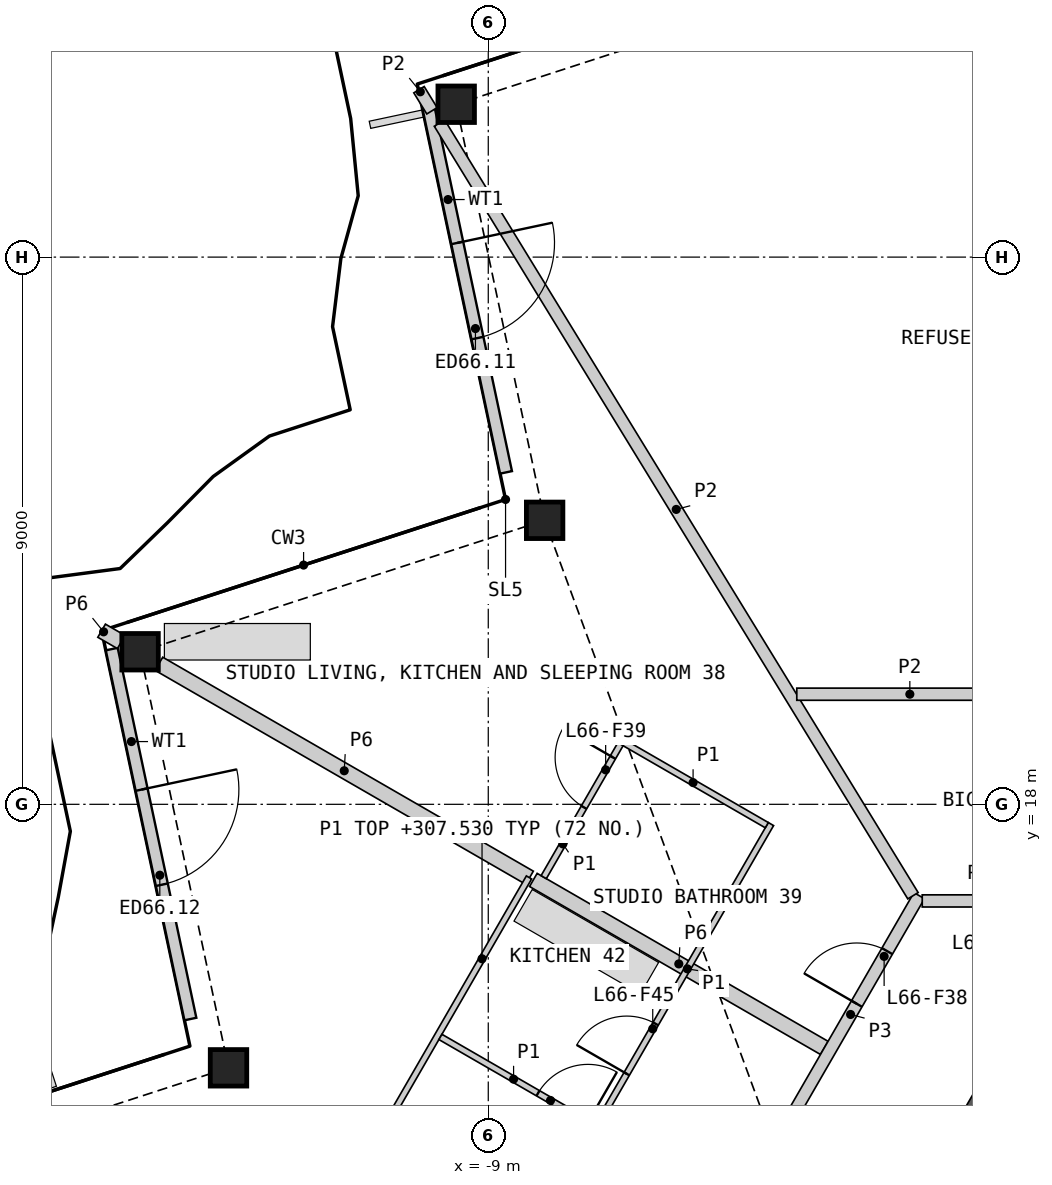
"""IFC4 building model, lengths in metres.
Left out: names, types, materials, properties, quantities, classifications, styles, units other than length and angle.
Written with IfcOpenShell. Run it as: python <this file> out.ifc"""

import sys

from ifc_helpers import new_model, si_unit, direction, frame, frame_2d, origin, origin_2d, place, context, subcontext, project, spatial, rectangle, hollow_rectangle, extrude, element, fill, save


model = new_model("IFC4")
c1 = context("Model", 3, precision=1e-05, world=origin(), true_north=direction((0.0, 1.0)))
c2 = subcontext(c1, "Body", "Model", "MODEL_VIEW")
j1 = project(units=[si_unit("LENGTHUNIT", "METRE"), si_unit("PLANEANGLEUNIT", "RADIAN")], contexts=[c1])
p1 = place(None, origin())
s1 = spatial("IfcSite", under=j1, at=p1, CompositionType="ELEMENT")
p2 = place(p1, origin())
s2 = spatial("IfcBuilding", under=s1, at=p2, CompositionType="ELEMENT")
p3 = place(p2, frame((0.0, 0.0, 305.2)))
s3 = spatial("IfcBuildingStorey", under=s2, at=p3, CompositionType="ELEMENT", Elevation=305.2)
for number, where, z_axis, x_axis in (
    (1, (-9.527, 29.514, 0.0), (0.0, 0.0, 1.0), (1.0, 0.0, 0.0)),
    (2, (-8.073, 22.671, 0.0), (0.0, 0.0, 1.0), (1.0, 0.0, 0.0)),
    (3, (-14.727, 20.509, 0.0), (0.0, 0.0, 1.0), (1.0, 0.0, 0.0)),
    (4, (-13.272, 13.666, 0.0), (0.0, 0.0, 1.0), (1.0, 0.0, 0.0)),
):
    element("IfcColumn", number, at=place(p3, frame(where, z_axis=z_axis, x_axis=x_axis)), inside=s3, PredefinedType="COLUMN", context=c2, shape_type="SweptSolid", body=[
        extrude(hollow_rectangle(XDim=0.6, YDim=0.6, WallThickness=0.04, at=origin_2d()), origin(), (0.0, 0.0, 1.0), 3.4),
    ])
p4 = place(p3, frame((-9.98, 29.443, 0.0), z_axis=(0.0, 0.0, 1.0), x_axis=(0.20793703803, -0.978142212674, 0.0)))
e5 = element("IfcWall", 5, at=p4, inside=s3, PredefinedType="SOLIDWALL", context=c2, shape_type="SweptSolid", body=[
    extrude(rectangle(XDim=6.117, YDim=0.2, at=frame_2d((3.059, 0.0))), origin(), (0.0, 0.0, 1.0), 2.488),
])
p5 = place(p4, frame((2.259, 0.0, 0.0)))
e6 = element("IfcOpeningElement", 6, at=p5, cuts=e5, PredefinedType="OPENING", context=c2, shape_type="SweptSolid", body=[
    extrude(rectangle(XDim=1.6, YDim=2.25, at=frame_2d((0.8, 1.125))), frame((0.0, 0.11, 0.0), z_axis=(0.0, -1.0, 0.0), x_axis=(1.0, 0.0, 0.0)), (0.0, 0.0, 1.0), 0.22),
])
p6 = place(p3, frame((-15.192, 20.553, 0.0), z_axis=(0.0, 0.0, 1.0), x_axis=(0.207920712138, -0.97814568315, 0.0)))
e7 = element("IfcWall", 7, at=p6, inside=s3, PredefinedType="SOLIDWALL", context=c2, shape_type="SweptSolid", body=[
    extrude(rectangle(XDim=6.221, YDim=0.2, at=frame_2d((3.11, 0.0))), origin(), (0.0, 0.0, 1.0), 2.488),
])
p7 = place(p6, frame((2.362, 0.0, 0.0)))
e8 = element("IfcOpeningElement", 8, at=p7, cuts=e7, PredefinedType="OPENING", context=c2, shape_type="SweptSolid", body=[
    extrude(rectangle(XDim=1.6, YDim=2.25, at=frame_2d((0.8, 1.125))), frame((0.0, 0.11, 0.0), z_axis=(0.0, -1.0, 0.0), x_axis=(1.0, 0.0, 0.0)), (0.0, 0.0, 1.0), 0.22),
])
p8 = place(p3, frame((-0.26, 13.961, 0.0), z_axis=(0.0, 0.0, 1.0), x_axis=(-0.499980485389, -0.866036670257, 0.0)))
e9 = element("IfcWall", 9, at=p8, inside=s3, PredefinedType="SHEAR", context=c2, shape_type="SweptSolid", body=[
    extrude(rectangle(XDim=4.559, YDim=0.6, at=frame_2d((2.28, 0.0))), origin(), (0.0, 0.0, 1.0), 3.1),
])
p9 = place(p3, frame((-14.417, 20.311, 0.0), z_axis=(0.0, 0.0, 1.0), x_axis=(0.866027308682, -0.499996700606, 0.0)))
e10 = element("IfcWall", 10, at=p9, inside=s3, PredefinedType="PARTITIONING", context=c2, shape_type="SweptSolid", body=[
    extrude(rectangle(XDim=7.038, YDim=0.25, at=frame_2d((3.519, 0.0))), origin(), (0.0, 0.0, 1.0), 2.33),
])
p10 = place(p3, frame((-8.259, 16.756, 0.0), z_axis=(0.0, 0.0, 1.0), x_axis=(0.866023692682, -0.500002963705, 0.0)))
e11 = element("IfcWall", 11, at=p10, inside=s3, PredefinedType="PARTITIONING", context=c2, shape_type="SweptSolid", body=[
    extrude(rectangle(XDim=5.525, YDim=0.25, at=frame_2d((2.762, 0.0))), origin(), (0.0, 0.0, 1.0), 2.33),
])
p11 = place(p3, frame((-4.169, 12.59, 0.0), z_axis=(0.0, 0.0, 1.0), x_axis=(0.499950370306, 0.866054055606, 0.0)))
e12 = element("IfcWall", 12, at=p11, inside=s3, PredefinedType="PARTITIONING", context=c2, shape_type="SweptSolid", body=[
    extrude(rectangle(XDim=4.513, YDim=0.2, at=frame_2d((2.256, 0.0))), origin(), (0.0, 0.0, 1.0), 3.1),
])
p12 = place(p11, frame((2.459, 0.0, 0.0)))
e13 = element("IfcOpeningElement", 13, at=p12, cuts=e12, PredefinedType="OPENING", context=c2, shape_type="SweptSolid", body=[
    extrude(rectangle(XDim=1.0, YDim=2.1, at=frame_2d((0.5, 1.05))), frame((0.0, 0.11, 0.0), z_axis=(0.0, -1.0, 0.0), x_axis=(1.0, 0.0, 0.0)), (0.0, 0.0, 1.0), 0.22),
])
p13 = place(p3, frame((-1.863, 16.411, 0.0), z_axis=(0.0, 0.0, 1.0), x_axis=(1.0, 0.0, 0.0)))
e14 = element("IfcWall", 14, at=p13, inside=s3, PredefinedType="PARTITIONING", context=c2, shape_type="SweptSolid", body=[
    extrude(rectangle(XDim=3.726, YDim=0.2, at=frame_2d((1.863, 0.0))), origin(), (0.0, 0.0, 1.0), 3.1),
])
p14 = place(p13, frame((1.388, 0.0, 0.0)))
e15 = element("IfcOpeningElement", 15, at=p14, cuts=e14, PredefinedType="OPENING", context=c2, shape_type="SweptSolid", body=[
    extrude(rectangle(XDim=0.95, YDim=2.1, at=frame_2d((0.475, 1.05))), frame((0.0, 0.11, 0.0), z_axis=(0.0, -1.0, 0.0), x_axis=(1.0, 0.0, 0.0)), (0.0, 0.0, 1.0), 0.22),
])
p15 = place(p3, frame((-15.359, 20.855, 0.0), z_axis=(0.0, 0.0, 1.0), x_axis=(0.865770353626, -0.500441499861, 0.0)))
e16 = element("IfcWall", 16, at=p15, inside=s3, PredefinedType="PARTITIONING", context=c2, shape_type="SweptSolid", body=[
    extrude(rectangle(XDim=0.372, YDim=0.25, at=frame_2d((0.186, 0.0))), origin(), (0.0, 0.0, 1.0), 2.33),
])
p16 = place(p3, frame((-9.802, 29.204, 0.0), z_axis=(0.0, 0.0, 1.0), x_axis=(0.522487920222, -0.852646687217, 0.0)))
e17 = element("IfcWall", 17, at=p16, inside=s3, PredefinedType="PARTITIONING", context=c2, shape_type="SweptSolid", body=[
    extrude(rectangle(XDim=14.904, YDim=0.2, at=frame_2d((7.452, 0.0))), origin(), (0.0, 0.0, 1.0), 2.33),
])
p17 = place(p3, frame((-3.926, 19.811, 0.0), z_axis=(0.0, 0.0, 1.0), x_axis=(1.0, 0.0, 0.0)))
e18 = element("IfcWall", 18, at=p17, inside=s3, PredefinedType="PARTITIONING", context=c2, shape_type="SweptSolid", body=[
    extrude(rectangle(XDim=3.718, YDim=0.2, at=frame_2d((1.859, 0.0))), origin(), (0.0, 0.0, 1.0), 2.33),
])
p18 = place(p3, frame((-10.139, 29.754, 0.0), z_axis=(0.0, 0.0, 1.0), x_axis=(0.522224976177, -0.852807759262, 0.0)))
e19 = element("IfcWall", 19, at=p18, inside=s3, PredefinedType="PARTITIONING", context=c2, shape_type="SweptSolid", body=[
    extrude(rectangle(XDim=0.408, YDim=0.2, at=frame_2d((0.204, 0.0))), origin(), (0.0, 0.0, 1.0), 2.33),
])
p19 = place(p3, frame((-16.054, 3.419, 0.0), z_axis=(0.0, 0.0, 1.0), x_axis=(0.499999256795, 0.866025832873, 0.0)))
e20 = element("IfcWall", 20, at=p19, inside=s3, PredefinedType="PARTITIONING", context=c2, shape_type="SweptSolid", body=[
    extrude(rectangle(XDim=15.448, YDim=0.1, at=frame_2d((7.724, 0.0))), origin(), (0.0, 0.0, 1.0), 2.33),
])
p20 = place(p19, frame((8.306, 0.0, 0.0)))
e21 = element("IfcOpeningElement", 21, at=p20, cuts=e20, PredefinedType="OPENING", context=c2, shape_type="SweptSolid", body=[
    extrude(rectangle(XDim=0.95, YDim=2.1, at=frame_2d((0.475, 1.05))), frame((0.0, 0.06, 0.0), z_axis=(0.0, -1.0, 0.0), x_axis=(1.0, 0.0, 0.0)), (0.0, 0.0, 1.0), 0.12),
])
p21 = place(p19, frame((1.76, 0.0, 0.0)))
e22 = element("IfcOpeningElement", 22, at=p21, cuts=e20, PredefinedType="OPENING", context=c2, shape_type="SweptSolid", body=[
    extrude(rectangle(XDim=0.95, YDim=2.1, at=frame_2d((0.475, 1.05))), frame((0.0, 0.06, 0.0), z_axis=(0.0, -1.0, 0.0), x_axis=(1.0, 0.0, 0.0)), (0.0, 0.0, 1.0), 0.12),
])
p22 = place(p3, frame((-9.787, 14.174, 0.0), z_axis=(0.0, 0.0, 1.0), x_axis=(0.866031222068, -0.499989922303, 0.0)))
e23 = element("IfcWall", 23, at=p22, inside=s3, PredefinedType="PARTITIONING", context=c2, shape_type="SweptSolid", body=[
    extrude(rectangle(XDim=5.557, YDim=0.1, at=frame_2d((2.779, 0.0))), origin(), (0.0, 0.0, 1.0), 2.33),
])
p23 = place(p22, frame((1.853, 0.0, 0.0)))
e24 = element("IfcOpeningElement", 24, at=p23, cuts=e23, PredefinedType="OPENING", context=c2, shape_type="SweptSolid", body=[
    extrude(rectangle(XDim=0.95, YDim=2.1, at=frame_2d((0.475, 1.05))), frame((0.0, 0.06, 0.0), z_axis=(0.0, -1.0, 0.0), x_axis=(1.0, 0.0, 0.0)), (0.0, 0.0, 1.0), 0.12),
])
p24 = place(p3, frame((-7.101, 12.912, 0.0), z_axis=(0.0, 0.0, 1.0), x_axis=(0.499996545922, 0.866027397988, 0.0)))
e25 = element("IfcWall", 25, at=p24, inside=s3, PredefinedType="PARTITIONING", context=c2, shape_type="SweptSolid", body=[
    extrude(rectangle(XDim=5.5, YDim=0.1, at=frame_2d((2.75, 0.0))), origin(), (0.0, 0.0, 1.0), 2.33),
])
p25 = place(p24, frame((0.756, 0.0, 0.0)))
e26 = element("IfcOpeningElement", 26, at=p25, cuts=e25, PredefinedType="OPENING", context=c2, shape_type="SweptSolid", body=[
    extrude(rectangle(XDim=0.95, YDim=2.1, at=frame_2d((0.475, 1.05))), frame((0.0, 0.06, 0.0), z_axis=(0.0, -1.0, 0.0), x_axis=(1.0, 0.0, 0.0)), (0.0, 0.0, 1.0), 0.12),
])
p26 = place(p3, frame((-6.844, 19.057, 0.0), z_axis=(0.0, 0.0, 1.0), x_axis=(0.866034573852, -0.49998411664, 0.0)))
e27 = element("IfcWall", 27, at=p26, inside=s3, PredefinedType="PARTITIONING", context=c2, shape_type="SweptSolid", body=[
    extrude(rectangle(XDim=2.8, YDim=0.1, at=frame_2d((1.4, 0.0))), origin(), (0.0, 0.0, 1.0), 2.33),
])
p27 = place(p3, frame((-8.088, 16.802, 0.0), z_axis=(0.0, 0.0, 1.0), x_axis=(0.499976333282, 0.866039067339, 0.0)))
e28 = element("IfcWall", 28, at=p27, inside=s3, PredefinedType="PARTITIONING", context=c2, shape_type="SweptSolid", body=[
    extrude(rectangle(XDim=2.525, YDim=0.1, at=frame_2d((1.262, 0.0))), origin(), (0.0, 0.0, 1.0), 2.33),
])
p28 = place(p27, frame((1.325, 0.0, 0.0)))
e29 = element("IfcOpeningElement", 29, at=p28, cuts=e28, PredefinedType="OPENING", context=c2, shape_type="SweptSolid", body=[
    extrude(rectangle(XDim=0.95, YDim=2.1, at=frame_2d((0.475, 1.05))), frame((0.0, 0.06, 0.0), z_axis=(0.0, -1.0, 0.0), x_axis=(1.0, 0.0, 0.0)), (0.0, 0.0, 1.0), 0.12),
])
p29 = place(p5, origin())
e30 = element("IfcDoor", 30, at=p29, inside=s3, OperationType="DOUBLE_DOOR_SINGLE_SWING", PredefinedType="DOOR", context=c2, shape_type="SweptSolid", body=[
    extrude(rectangle(XDim=1.6, YDim=2.25, at=frame_2d((0.8, 1.125))), frame((0.0, 0.025, 0.0), z_axis=(0.0, -1.0, 0.0), x_axis=(1.0, 0.0, 0.0)), (0.0, 0.0, 1.0), 0.05),
])
fill(e6, e30)
p30 = place(p7, origin())
e31 = element("IfcDoor", 31, at=p30, inside=s3, OperationType="DOUBLE_DOOR_SINGLE_SWING", PredefinedType="DOOR", context=c2, shape_type="SweptSolid", body=[
    extrude(rectangle(XDim=1.6, YDim=2.25, at=frame_2d((0.8, 1.125))), frame((0.0, 0.025, 0.0), z_axis=(0.0, -1.0, 0.0), x_axis=(1.0, 0.0, 0.0)), (0.0, 0.0, 1.0), 0.05),
])
fill(e8, e31)
p31 = place(p12, origin())
e32 = element("IfcDoor", 32, at=p31, inside=s3, OperationType="SINGLE_SWING_LEFT", PredefinedType="DOOR", context=c2, shape_type="SweptSolid", body=[
    extrude(rectangle(XDim=1.0, YDim=2.1, at=frame_2d((0.5, 1.05))), frame((0.0, 0.025, 0.0), z_axis=(0.0, -1.0, 0.0), x_axis=(1.0, 0.0, 0.0)), (0.0, 0.0, 1.0), 0.05),
])
fill(e13, e32)
p32 = place(p28, origin())
e33 = element("IfcDoor", 33, at=p32, inside=s3, OperationType="SINGLE_SWING_RIGHT", PredefinedType="DOOR", context=c2, shape_type="SweptSolid", body=[
    extrude(rectangle(XDim=0.95, YDim=2.1, at=frame_2d((0.475, 1.05))), frame((0.0, 0.025, 0.0), z_axis=(0.0, -1.0, 0.0), x_axis=(1.0, 0.0, 0.0)), (0.0, 0.0, 1.0), 0.05),
])
fill(e29, e33)
p33 = place(p23, origin())
e34 = element("IfcDoor", 34, at=p33, inside=s3, OperationType="SINGLE_SWING_RIGHT", PredefinedType="DOOR", context=c2, shape_type="SweptSolid", body=[
    extrude(rectangle(XDim=0.95, YDim=2.1, at=frame_2d((0.475, 1.05))), frame((0.0, 0.025, 0.0), z_axis=(0.0, -1.0, 0.0), x_axis=(1.0, 0.0, 0.0)), (0.0, 0.0, 1.0), 0.05),
])
fill(e24, e34)
p34 = place(p25, origin())
e35 = element("IfcDoor", 35, at=p34, inside=s3, OperationType="SINGLE_SWING_LEFT", PredefinedType="DOOR", context=c2, shape_type="SweptSolid", body=[
    extrude(rectangle(XDim=0.95, YDim=2.1, at=frame_2d((0.475, 1.05))), frame((0.0, 0.025, 0.0), z_axis=(0.0, -1.0, 0.0), x_axis=(1.0, 0.0, 0.0)), (0.0, 0.0, 1.0), 0.05),
])
fill(e26, e35)
save(model, sys.argv[1])
